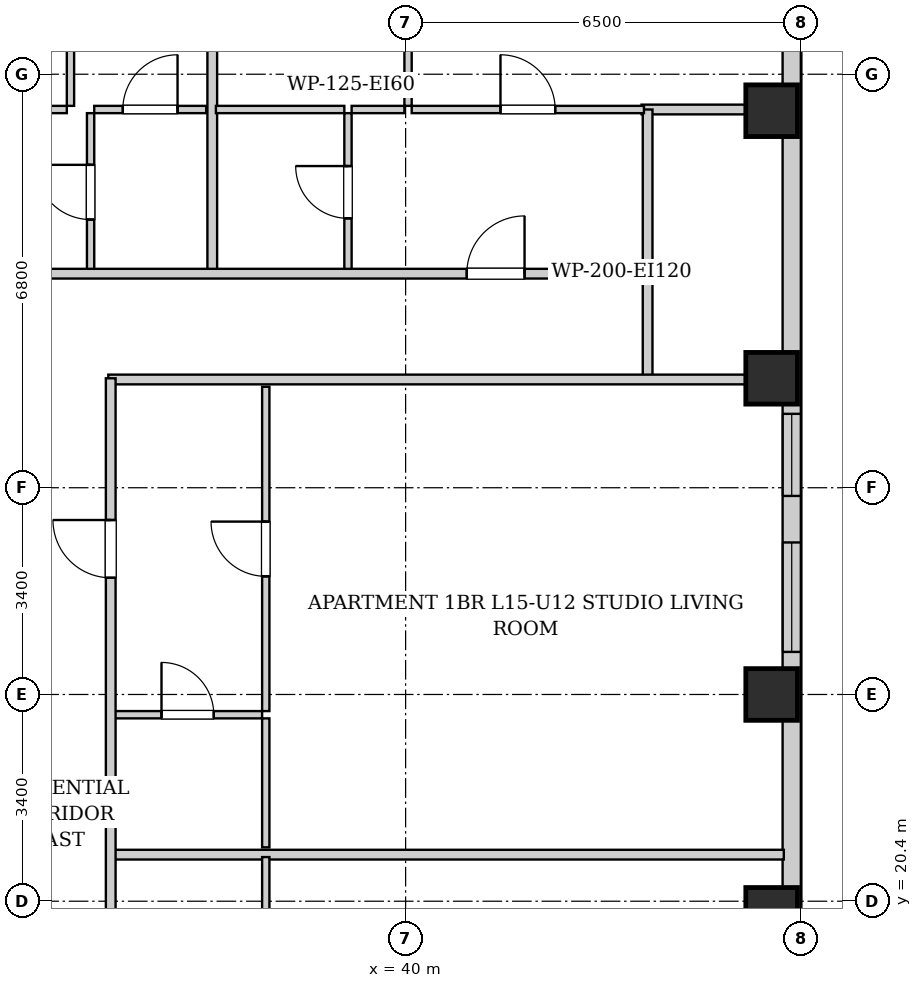
"""IFC4 building model, lengths in metres.
Left out: names, types, materials, properties, quantities, classifications, styles, units other than length and angle.
Written with IfcOpenShell. Run it as: python <this file> out.ifc"""

import sys

from ifc_helpers import new_model, si_unit, direction, frame, frame_2d, origin, origin_2d, place, context, subcontext, project, spatial, rectangle, extrude, element, fill, save


model = new_model("IFC4")
c1 = context("Model", 3, precision=1e-05, world=origin(), true_north=direction((0.0, 1.0)))
c2 = subcontext(c1, "Body", "Model", "MODEL_VIEW")
j1 = project(units=[si_unit("LENGTHUNIT", "METRE"), si_unit("PLANEANGLEUNIT", "RADIAN")], contexts=[c1])
p1 = place(None, origin())
s1 = spatial("IfcSite", under=j1, at=p1, CompositionType="ELEMENT")
p2 = place(p1, origin())
s2 = spatial("IfcBuilding", under=s1, at=p2, CompositionType="ELEMENT")
p3 = place(p2, frame((0.0, 0.0, 57.8)))
s3 = spatial("IfcBuildingStorey", under=s2, at=p3, CompositionType="ELEMENT", Elevation=57.8)
for number, where, z_axis, x_axis in (
    (1, (46.02, 20.2, 0.0), (0.0, 0.0, 1.0), (1.0, 0.0, 0.0)),
    (2, (46.02, 23.8, 0.0), (0.0, 0.0, 1.0), (1.0, 0.0, 0.0)),
    (3, (46.02, 29.0, 0.0), (0.0, 0.0, 1.0), (1.0, 0.0, 0.0)),
    (4, (46.02, 33.4, 0.0), (0.0, 0.0, 1.0), (1.0, 0.0, 0.0)),
):
    element("IfcColumn", number, at=place(p3, frame(where, z_axis=z_axis, x_axis=x_axis)), inside=s3, PredefinedType="COLUMN", context=c2, shape_type="SweptSolid", body=[
        extrude(rectangle(XDim=0.85, YDim=0.85, at=origin_2d()), origin(), (0.0, 0.0, 1.0), 3.2),
    ])
p4 = place(p3, frame((46.35, 45.1, 0.0), z_axis=(0.0, 0.0, 1.0), x_axis=(0.0, -1.0, 0.0)))
e5 = element("IfcWall", 5, at=p4, inside=s3, PredefinedType="SOLIDWALL", context=c2, shape_type="SweptSolid", body=[
    extrude(rectangle(XDim=42.6, YDim=0.3, at=frame_2d((21.3, 0.0))), origin(), (0.0, 0.0, 1.0), 1.975),
])
p5 = place(p4, frame((37.575, 0.0, 0.55)))
e6 = element("IfcOpeningElement", 6, at=p5, cuts=e5, PredefinedType="OPENING", context=c2, shape_type="SweptSolid", body=[
    extrude(rectangle(XDim=1.8, YDim=1.2, at=frame_2d((0.9, 0.6))), frame((0.0, 0.16, 0.0), z_axis=(0.0, -1.0, 0.0), x_axis=(1.0, 0.0, 0.0)), (0.0, 0.0, 1.0), 0.32),
])
p6 = place(p4, frame((34.85, 0.0, 0.55)))
e7 = element("IfcOpeningElement", 7, at=p6, cuts=e5, PredefinedType="OPENING", context=c2, shape_type="SweptSolid", body=[
    extrude(rectangle(XDim=1.35, YDim=1.2, at=frame_2d((0.675, 0.6))), frame((0.0, 0.16, 0.0), z_axis=(0.0, -1.0, 0.0), x_axis=(1.0, 0.0, 0.0)), (0.0, 0.0, 1.0), 0.32),
])
p7 = place(p4, frame((3.715, 0.0, 0.55)))
e8 = element("IfcOpeningElement", 8, at=p7, cuts=e5, PredefinedType="OPENING", context=c2, shape_type="SweptSolid", body=[
    extrude(rectangle(XDim=1.8, YDim=1.2, at=frame_2d((0.9, 0.6))), frame((0.0, 0.16, 0.0), z_axis=(0.0, -1.0, 0.0), x_axis=(1.0, 0.0, 0.0)), (0.0, 0.0, 1.0), 0.32),
])
p8 = place(p4, frame((1.185, 0.0, 0.55)))
e9 = element("IfcOpeningElement", 9, at=p8, cuts=e5, PredefinedType="OPENING", context=c2, shape_type="SweptSolid", body=[
    extrude(rectangle(XDim=1.35, YDim=1.2, at=frame_2d((0.675, 0.6))), frame((0.0, 0.16, 0.0), z_axis=(0.0, -1.0, 0.0), x_axis=(1.0, 0.0, 0.0)), (0.0, 0.0, 1.0), 0.32),
])
p9 = place(p4, frame((26.025, 0.0, 0.55)))
e10 = element("IfcOpeningElement", 10, at=p9, cuts=e5, PredefinedType="OPENING", context=c2, shape_type="SweptSolid", body=[
    extrude(rectangle(XDim=1.8, YDim=1.2, at=frame_2d((0.9, 0.6))), frame((0.0, 0.16, 0.0), z_axis=(0.0, -1.0, 0.0), x_axis=(1.0, 0.0, 0.0)), (0.0, 0.0, 1.0), 0.32),
])
p10 = place(p4, frame((28.085, 0.0, 0.55)))
e11 = element("IfcOpeningElement", 11, at=p10, cuts=e5, PredefinedType="OPENING", context=c2, shape_type="SweptSolid", body=[
    extrude(rectangle(XDim=1.35, YDim=1.2, at=frame_2d((0.675, 0.6))), frame((0.0, 0.16, 0.0), z_axis=(0.0, -1.0, 0.0), x_axis=(1.0, 0.0, 0.0)), (0.0, 0.0, 1.0), 0.32),
])
p11 = place(p4, frame((18.8, 0.0, 0.55)))
e12 = element("IfcOpeningElement", 12, at=p11, cuts=e5, PredefinedType="OPENING", context=c2, shape_type="SweptSolid", body=[
    extrude(rectangle(XDim=1.8, YDim=1.2, at=frame_2d((0.9, 0.6))), frame((0.0, 0.16, 0.0), z_axis=(0.0, -1.0, 0.0), x_axis=(1.0, 0.0, 0.0)), (0.0, 0.0, 1.0), 0.32),
])
p12 = place(p4, frame((16.685, 0.0, 0.55)))
e13 = element("IfcOpeningElement", 13, at=p12, cuts=e5, PredefinedType="OPENING", context=c2, shape_type="SweptSolid", body=[
    extrude(rectangle(XDim=1.35, YDim=1.2, at=frame_2d((0.675, 0.6))), frame((0.0, 0.16, 0.0), z_axis=(0.0, -1.0, 0.0), x_axis=(1.0, 0.0, 0.0)), (0.0, 0.0, 1.0), 0.32),
])
p13 = place(p3, frame((43.98, 28.98, 0.0), z_axis=(0.0, 0.0, 1.0), x_axis=(0.0, 1.0, 0.0)))
e14 = element("IfcWall", 14, at=p13, inside=s3, PredefinedType="PARTITIONING", context=c2, shape_type="SweptSolid", body=[
    extrude(rectangle(XDim=1.74, YDim=0.16, at=frame_2d((0.87, 0.0))), origin(), (0.0, 0.0, 1.0), 2.94),
])
p14 = place(p3, frame((35.11, 28.98, 0.0), z_axis=(0.0, 0.0, 1.0), x_axis=(1.0, 0.0, 0.0)))
e15 = element("IfcWall", 15, at=p14, inside=s3, PredefinedType="PARTITIONING", context=c2, shape_type="SweptSolid", body=[
    extrude(rectangle(XDim=11.11, YDim=0.16, at=frame_2d((5.555, 0.0))), origin(), (0.0, 0.0, 1.0), 2.232),
])
p15 = place(p3, frame((34.819, 30.76, 0.0), z_axis=(0.0, 0.0, 1.0), x_axis=(0.0, 1.0, 0.0)))
e16 = element("IfcWall", 16, at=p15, inside=s3, PredefinedType="PARTITIONING", context=c2, shape_type="SweptSolid", body=[
    extrude(rectangle(XDim=2.6, YDim=0.12, at=frame_2d((1.3, 0.0))), origin(), (0.0, 0.0, 1.0), 2.94),
])
p16 = place(p15, frame((0.85, 0.0, 0.0)))
e17 = element("IfcOpeningElement", 17, at=p16, cuts=e16, PredefinedType="OPENING", context=c2, shape_type="SweptSolid", body=[
    extrude(rectangle(XDim=0.9, YDim=2.05, at=frame_2d((0.45, 1.025))), frame((0.0, 0.07, 0.0), z_axis=(0.0, -1.0, 0.0), x_axis=(1.0, 0.0, 0.0)), (0.0, 0.0, 1.0), 0.14),
])
p17 = place(p3, frame((31.676, 33.42, 0.0), z_axis=(0.0, 0.0, 1.0), x_axis=(1.0, 0.0, 0.0)))
e18 = element("IfcWall", 18, at=p17, inside=s3, PredefinedType="PARTITIONING", context=c2, shape_type="SweptSolid", body=[
    extrude(rectangle(XDim=2.752, YDim=0.12, at=frame_2d((1.376, 0.0))), origin(), (0.0, 0.0, 1.0), 2.94),
])
p18 = place(p17, frame((0.926, 0.0, 0.0)))
e19 = element("IfcOpeningElement", 19, at=p18, cuts=e18, PredefinedType="OPENING", context=c2, shape_type="SweptSolid", body=[
    extrude(rectangle(XDim=0.9, YDim=2.05, at=frame_2d((0.45, 1.025))), frame((0.0, 0.07, 0.0), z_axis=(0.0, -1.0, 0.0), x_axis=(1.0, 0.0, 0.0)), (0.0, 0.0, 1.0), 0.14),
])
p19 = place(p3, frame((34.879, 33.42, 0.0), z_axis=(0.0, 0.0, 1.0), x_axis=(1.0, 0.0, 0.0)))
e20 = element("IfcWall", 20, at=p19, inside=s3, PredefinedType="PARTITIONING", context=c2, shape_type="SweptSolid", body=[
    extrude(rectangle(XDim=1.841, YDim=0.12, at=frame_2d((0.92, 0.0))), origin(), (0.0, 0.0, 1.0), 2.94),
])
p20 = place(p19, frame((0.47, 0.0, 0.0)))
e21 = element("IfcOpeningElement", 21, at=p20, cuts=e20, PredefinedType="OPENING", context=c2, shape_type="SweptSolid", body=[
    extrude(rectangle(XDim=0.9, YDim=2.05, at=frame_2d((0.45, 1.025))), frame((0.0, 0.07, 0.0), z_axis=(0.0, -1.0, 0.0), x_axis=(1.0, 0.0, 0.0)), (0.0, 0.0, 1.0), 0.14),
])
p21 = place(p3, frame((34.488, 33.48, 0.0), z_axis=(0.0, 0.0, 1.0), x_axis=(0.0, 1.0, 0.0)))
e22 = element("IfcWall", 22, at=p21, inside=s3, PredefinedType="PARTITIONING", context=c2, shape_type="SweptSolid", body=[
    extrude(rectangle(XDim=13.84, YDim=0.12, at=frame_2d((6.92, 0.0))), origin(), (0.0, 0.0, 1.0), 2.94),
])
p22 = place(p21, frame((6.455, 0.0, 0.0)))
e23 = element("IfcOpeningElement", 23, at=p22, cuts=e22, PredefinedType="OPENING", context=c2, shape_type="SweptSolid", body=[
    extrude(rectangle(XDim=0.9, YDim=2.05, at=frame_2d((0.45, 1.025))), frame((0.0, 0.07, 0.0), z_axis=(0.0, -1.0, 0.0), x_axis=(1.0, 0.0, 0.0)), (0.0, 0.0, 1.0), 0.14),
])
p23 = place(p3, frame((43.88, 33.42, 0.0), z_axis=(0.0, 0.0, 1.0), x_axis=(1.0, 0.0, 0.0)))
e24 = element("IfcWall", 24, at=p23, inside=s3, PredefinedType="PARTITIONING", context=c2, shape_type="SweptSolid", body=[
    extrude(rectangle(XDim=2.34, YDim=0.16, at=frame_2d((1.17, 0.0))), origin(), (0.0, 0.0, 1.0), 2.94),
])
p24 = place(p3, frame((43.98, 30.76, 0.0), z_axis=(0.0, 0.0, 1.0), x_axis=(0.0, 1.0, 0.0)))
e25 = element("IfcWall", 25, at=p24, inside=s3, PredefinedType="PARTITIONING", context=c2, shape_type="SweptSolid", body=[
    extrude(rectangle(XDim=2.66, YDim=0.16, at=frame_2d((1.33, 0.0))), origin(), (0.0, 0.0, 1.0), 2.94),
])
p25 = place(p3, frame((36.82, 30.76, 0.0), z_axis=(0.0, 0.0, 1.0), x_axis=(0.0, 1.0, 0.0)))
e26 = element("IfcWall", 26, at=p25, inside=s3, PredefinedType="PARTITIONING", context=c2, shape_type="SweptSolid", body=[
    extrude(rectangle(XDim=16.56, YDim=0.16, at=frame_2d((8.28, 0.0))), origin(), (0.0, 0.0, 1.0), 2.94),
])
p26 = place(p3, frame((39.052, 30.76, 0.0), z_axis=(0.0, 0.0, 1.0), x_axis=(0.0, 1.0, 0.0)))
e27 = element("IfcWall", 27, at=p26, inside=s3, PredefinedType="PARTITIONING", context=c2, shape_type="SweptSolid", body=[
    extrude(rectangle(XDim=2.6, YDim=0.12, at=frame_2d((1.3, 0.0))), origin(), (0.0, 0.0, 1.0), 2.94),
])
p27 = place(p26, frame((0.87, 0.0, 0.0)))
e28 = element("IfcOpeningElement", 28, at=p27, cuts=e27, PredefinedType="OPENING", context=c2, shape_type="SweptSolid", body=[
    extrude(rectangle(XDim=0.86, YDim=2.05, at=frame_2d((0.43, 1.025))), frame((0.0, 0.07, 0.0), z_axis=(0.0, -1.0, 0.0), x_axis=(1.0, 0.0, 0.0)), (0.0, 0.0, 1.0), 0.14),
])
p28 = place(p3, frame((36.88, 33.42, 0.0), z_axis=(0.0, 0.0, 1.0), x_axis=(1.0, 0.0, 0.0)))
e29 = element("IfcWall", 29, at=p28, inside=s3, PredefinedType="PARTITIONING", context=c2, shape_type="SweptSolid", body=[
    extrude(rectangle(XDim=2.112, YDim=0.12, at=frame_2d((1.056, 0.0))), origin(), (0.0, 0.0, 1.0), 2.94),
])
p29 = place(p3, frame((39.112, 33.42, 0.0), z_axis=(0.0, 0.0, 1.0), x_axis=(1.0, 0.0, 0.0)))
e30 = element("IfcWall", 30, at=p29, inside=s3, PredefinedType="PARTITIONING", context=c2, shape_type="SweptSolid", body=[
    extrude(rectangle(XDim=0.868, YDim=0.12, at=frame_2d((0.434, 0.0))), origin(), (0.0, 0.0, 1.0), 2.94),
])
p30 = place(p3, frame((40.1, 33.42, 0.0), z_axis=(0.0, 0.0, 1.0), x_axis=(1.0, 0.0, 0.0)))
e31 = element("IfcWall", 31, at=p30, inside=s3, PredefinedType="PARTITIONING", context=c2, shape_type="SweptSolid", body=[
    extrude(rectangle(XDim=3.82, YDim=0.12, at=frame_2d((1.91, 0.0))), origin(), (0.0, 0.0, 1.0), 2.94),
])
p31 = place(p30, frame((1.46, 0.0, 0.0)))
e32 = element("IfcOpeningElement", 32, at=p31, cuts=e31, PredefinedType="OPENING", context=c2, shape_type="SweptSolid", body=[
    extrude(rectangle(XDim=0.9, YDim=2.05, at=frame_2d((0.45, 1.025))), frame((0.0, 0.07, 0.0), z_axis=(0.0, -1.0, 0.0), x_axis=(1.0, 0.0, 0.0)), (0.0, 0.0, 1.0), 0.14),
])
p32 = place(p3, frame((40.04, 33.48, 0.0), z_axis=(0.0, 0.0, 1.0), x_axis=(0.0, 1.0, 0.0)))
e33 = element("IfcWall", 33, at=p32, inside=s3, PredefinedType="PARTITIONING", context=c2, shape_type="SweptSolid", body=[
    extrude(rectangle(XDim=11.69, YDim=0.12, at=frame_2d((5.845, 0.0))), origin(), (0.0, 0.0, 1.0), 2.94),
])
p33 = place(p32, frame((5.395, 0.0, 0.0)))
e34 = element("IfcOpeningElement", 34, at=p33, cuts=e33, PredefinedType="OPENING", context=c2, shape_type="SweptSolid", body=[
    extrude(rectangle(XDim=0.9, YDim=2.05, at=frame_2d((0.45, 1.025))), frame((0.0, 0.07, 0.0), z_axis=(0.0, -1.0, 0.0), x_axis=(1.0, 0.0, 0.0)), (0.0, 0.0, 1.0), 0.14),
])
p34 = place(p3, frame((35.19, 21.166, 0.0), z_axis=(0.0, 0.0, 1.0), x_axis=(1.0, 0.0, 0.0)))
e35 = element("IfcWall", 35, at=p34, inside=s3, PredefinedType="PARTITIONING", context=c2, shape_type="SweptSolid", body=[
    extrude(rectangle(XDim=11.03, YDim=0.16, at=frame_2d((5.515, 0.0))), origin(), (0.0, 0.0, 1.0), 2.94),
])
p35 = place(p3, frame((37.7, 17.18, 0.0), z_axis=(0.0, 0.0, 1.0), x_axis=(0.0, 1.0, 0.0)))
e36 = element("IfcWall", 36, at=p35, inside=s3, PredefinedType="PARTITIONING", context=c2, shape_type="SweptSolid", body=[
    extrude(rectangle(XDim=3.946, YDim=0.12, at=frame_2d((1.973, 0.0))), origin(), (0.0, 0.0, 1.0), 2.94),
])
p36 = place(p35, frame((1.523, 0.0, 0.0)))
e37 = element("IfcOpeningElement", 37, at=p36, cuts=e36, PredefinedType="OPENING", context=c2, shape_type="SweptSolid", body=[
    extrude(rectangle(XDim=0.9, YDim=2.05, at=frame_2d((0.45, 1.025))), frame((0.0, 0.07, 0.0), z_axis=(0.0, -1.0, 0.0), x_axis=(1.0, 0.0, 0.0)), (0.0, 0.0, 1.0), 0.14),
])
p37 = place(p3, frame((35.19, 23.467, 0.0), z_axis=(0.0, 0.0, 1.0), x_axis=(1.0, 0.0, 0.0)))
e38 = element("IfcWall", 38, at=p37, inside=s3, PredefinedType="PARTITIONING", context=c2, shape_type="SweptSolid", body=[
    extrude(rectangle(XDim=2.45, YDim=0.12, at=frame_2d((1.225, 0.0))), origin(), (0.0, 0.0, 1.0), 2.94),
])
p38 = place(p37, frame((0.795, 0.0, 0.0)))
e39 = element("IfcOpeningElement", 39, at=p38, cuts=e38, PredefinedType="OPENING", context=c2, shape_type="SweptSolid", body=[
    extrude(rectangle(XDim=0.86, YDim=2.05, at=frame_2d((0.43, 1.025))), frame((0.0, 0.07, 0.0), z_axis=(0.0, -1.0, 0.0), x_axis=(1.0, 0.0, 0.0)), (0.0, 0.0, 1.0), 0.14),
])
p39 = place(p3, frame((37.7, 21.286, 0.0), z_axis=(0.0, 0.0, 1.0), x_axis=(0.0, 1.0, 0.0)))
e40 = element("IfcWall", 40, at=p39, inside=s3, PredefinedType="PARTITIONING", context=c2, shape_type="SweptSolid", body=[
    extrude(rectangle(XDim=2.121, YDim=0.12, at=frame_2d((1.061, 0.0))), origin(), (0.0, 0.0, 1.0), 2.94),
])
p40 = place(p3, frame((37.7, 23.527, 0.0), z_axis=(0.0, 0.0, 1.0), x_axis=(0.0, 1.0, 0.0)))
e41 = element("IfcWall", 41, at=p40, inside=s3, PredefinedType="PARTITIONING", context=c2, shape_type="SweptSolid", body=[
    extrude(rectangle(XDim=5.333, YDim=0.12, at=frame_2d((2.667, 0.0))), origin(), (0.0, 0.0, 1.0), 2.94),
])
p41 = place(p40, frame((2.216, 0.0, 0.0)))
e42 = element("IfcOpeningElement", 42, at=p41, cuts=e41, PredefinedType="OPENING", context=c2, shape_type="SweptSolid", body=[
    extrude(rectangle(XDim=0.9, YDim=2.05, at=frame_2d((0.45, 1.025))), frame((0.0, 0.07, 0.0), z_axis=(0.0, -1.0, 0.0), x_axis=(1.0, 0.0, 0.0)), (0.0, 0.0, 1.0), 0.14),
])
p42 = place(p3, frame((10.05, 30.72, 0.0), z_axis=(0.0, 0.0, 1.0), x_axis=(1.0, 0.0, 0.0)))
e43 = element("IfcWall", 43, at=p42, inside=s3, PredefinedType="PARTITIONING", context=c2, shape_type="SweptSolid", body=[
    extrude(rectangle(XDim=33.9, YDim=0.16, at=frame_2d((16.95, 0.0))), origin(), (0.0, 0.0, 1.0), 2.94),
])
p43 = place(p42, frame((3.8, 0.0, 0.0)))
e44 = element("IfcOpeningElement", 44, at=p43, cuts=e43, PredefinedType="OPENING", context=c2, shape_type="SweptSolid", body=[
    extrude(rectangle(XDim=0.95, YDim=2.1, at=frame_2d((0.475, 1.05))), frame((0.0, 0.09, 0.0), z_axis=(0.0, -1.0, 0.0), x_axis=(1.0, 0.0, 0.0)), (0.0, 0.0, 1.0), 0.18),
])
p44 = place(p42, frame((11.977, 0.0, 0.0)))
e45 = element("IfcOpeningElement", 45, at=p44, cuts=e43, PredefinedType="OPENING", context=c2, shape_type="SweptSolid", body=[
    extrude(rectangle(XDim=0.95, YDim=2.1, at=frame_2d((0.475, 1.05))), frame((0.0, 0.09, 0.0), z_axis=(0.0, -1.0, 0.0), x_axis=(1.0, 0.0, 0.0)), (0.0, 0.0, 1.0), 0.18),
])
p45 = place(p42, frame((18.09, 0.0, 0.0)))
e46 = element("IfcOpeningElement", 46, at=p45, cuts=e43, PredefinedType="OPENING", context=c2, shape_type="SweptSolid", body=[
    extrude(rectangle(XDim=0.95, YDim=2.1, at=frame_2d((0.475, 1.05))), frame((0.0, 0.09, 0.0), z_axis=(0.0, -1.0, 0.0), x_axis=(1.0, 0.0, 0.0)), (0.0, 0.0, 1.0), 0.18),
])
p46 = place(p42, frame((30.956, 0.0, 0.0)))
e47 = element("IfcOpeningElement", 47, at=p46, cuts=e43, PredefinedType="OPENING", context=c2, shape_type="SweptSolid", body=[
    extrude(rectangle(XDim=0.95, YDim=2.1, at=frame_2d((0.475, 1.05))), frame((0.0, 0.09, 0.0), z_axis=(0.0, -1.0, 0.0), x_axis=(1.0, 0.0, 0.0)), (0.0, 0.0, 1.0), 0.18),
])
p47 = place(p3, frame((35.15, 15.07, 0.0), z_axis=(0.0, 0.0, 1.0), x_axis=(0.0, 1.0, 0.0)))
e48 = element("IfcWall", 48, at=p47, inside=s3, PredefinedType="PARTITIONING", context=c2, shape_type="SweptSolid", body=[
    extrude(rectangle(XDim=13.93, YDim=0.16, at=frame_2d((6.965, 0.0))), origin(), (0.0, 0.0, 1.0), 2.94),
])
p48 = place(p47, frame((3.608, 0.0, 0.0)))
e49 = element("IfcOpeningElement", 49, at=p48, cuts=e48, PredefinedType="OPENING", context=c2, shape_type="SweptSolid", body=[
    extrude(rectangle(XDim=0.95, YDim=2.1, at=frame_2d((0.475, 1.05))), frame((0.0, 0.09, 0.0), z_axis=(0.0, -1.0, 0.0), x_axis=(1.0, 0.0, 0.0)), (0.0, 0.0, 1.0), 0.18),
])
p49 = place(p47, frame((10.649, 0.0, 0.0)))
e50 = element("IfcOpeningElement", 50, at=p49, cuts=e48, PredefinedType="OPENING", context=c2, shape_type="SweptSolid", body=[
    extrude(rectangle(XDim=0.95, YDim=2.1, at=frame_2d((0.475, 1.05))), frame((0.0, 0.09, 0.0), z_axis=(0.0, -1.0, 0.0), x_axis=(1.0, 0.0, 0.0)), (0.0, 0.0, 1.0), 0.18),
])
p50 = place(p16, origin())
e51 = element("IfcDoor", 51, at=p50, inside=s3, OperationType="SINGLE_SWING_RIGHT", PredefinedType="DOOR", context=c2, shape_type="SweptSolid", body=[
    extrude(rectangle(XDim=0.9, YDim=2.05, at=frame_2d((0.45, 1.025))), frame((0.0, 0.025, 0.0), z_axis=(0.0, -1.0, 0.0), x_axis=(1.0, 0.0, 0.0)), (0.0, 0.0, 1.0), 0.05),
])
fill(e17, e51)
p51 = place(p20, origin())
e52 = element("IfcDoor", 52, at=p51, inside=s3, OperationType="SINGLE_SWING_RIGHT", PredefinedType="DOOR", context=c2, shape_type="SweptSolid", body=[
    extrude(rectangle(XDim=0.9, YDim=2.05, at=frame_2d((0.45, 1.025))), frame((0.0, 0.025, 0.0), z_axis=(0.0, -1.0, 0.0), x_axis=(1.0, 0.0, 0.0)), (0.0, 0.0, 1.0), 0.05),
])
fill(e21, e52)
p52 = place(p27, origin())
e53 = element("IfcDoor", 53, at=p52, inside=s3, OperationType="SINGLE_SWING_RIGHT", PredefinedType="DOOR", context=c2, shape_type="SweptSolid", body=[
    extrude(rectangle(XDim=0.86, YDim=2.05, at=frame_2d((0.43, 1.025))), frame((0.0, 0.025, 0.0), z_axis=(0.0, -1.0, 0.0), x_axis=(1.0, 0.0, 0.0)), (0.0, 0.0, 1.0), 0.05),
])
fill(e28, e53)
p53 = place(p31, origin())
e54 = element("IfcDoor", 54, at=p53, inside=s3, OperationType="SINGLE_SWING_LEFT", PredefinedType="DOOR", context=c2, shape_type="SweptSolid", body=[
    extrude(rectangle(XDim=0.9, YDim=2.05, at=frame_2d((0.45, 1.025))), frame((0.0, 0.025, 0.0), z_axis=(0.0, -1.0, 0.0), x_axis=(1.0, 0.0, 0.0)), (0.0, 0.0, 1.0), 0.05),
])
fill(e32, e54)
p54 = place(p38, origin())
e55 = element("IfcDoor", 55, at=p54, inside=s3, OperationType="SINGLE_SWING_LEFT", PredefinedType="DOOR", context=c2, shape_type="SweptSolid", body=[
    extrude(rectangle(XDim=0.86, YDim=2.05, at=frame_2d((0.43, 1.025))), frame((0.0, 0.025, 0.0), z_axis=(0.0, -1.0, 0.0), x_axis=(1.0, 0.0, 0.0)), (0.0, 0.0, 1.0), 0.05),
])
fill(e39, e55)
p55 = place(p41, origin())
e56 = element("IfcDoor", 56, at=p55, inside=s3, OperationType="SINGLE_SWING_RIGHT", PredefinedType="DOOR", context=c2, shape_type="SweptSolid", body=[
    extrude(rectangle(XDim=0.9, YDim=2.05, at=frame_2d((0.45, 1.025))), frame((0.0, 0.025, 0.0), z_axis=(0.0, -1.0, 0.0), x_axis=(1.0, 0.0, 0.0)), (0.0, 0.0, 1.0), 0.05),
])
fill(e42, e56)
p56 = place(p46, origin())
e57 = element("IfcDoor", 57, at=p56, inside=s3, OperationType="SINGLE_SWING_RIGHT", PredefinedType="DOOR", context=c2, shape_type="SweptSolid", body=[
    extrude(rectangle(XDim=0.95, YDim=2.1, at=frame_2d((0.475, 1.05))), frame((0.0, 0.025, 0.0), z_axis=(0.0, -1.0, 0.0), x_axis=(1.0, 0.0, 0.0)), (0.0, 0.0, 1.0), 0.05),
])
fill(e47, e57)
p57 = place(p49, origin())
e58 = element("IfcDoor", 58, at=p57, inside=s3, OperationType="SINGLE_SWING_RIGHT", PredefinedType="DOOR", context=c2, shape_type="SweptSolid", body=[
    extrude(rectangle(XDim=0.95, YDim=2.1, at=frame_2d((0.475, 1.05))), frame((0.0, 0.025, 0.0), z_axis=(0.0, -1.0, 0.0), x_axis=(1.0, 0.0, 0.0)), (0.0, 0.0, 1.0), 0.05),
])
fill(e50, e58)
p58 = place(p11, origin())
e59 = element("IfcWindow", 59, at=p58, inside=s3, PartitioningType="DOUBLE_PANEL_VERTICAL", PredefinedType="WINDOW", context=c2, shape_type="SweptSolid", body=[
    extrude(rectangle(XDim=1.8, YDim=1.2, at=frame_2d((0.9, 0.6))), frame((0.0, 0.03, 0.0), z_axis=(0.0, -1.0, 0.0), x_axis=(1.0, 0.0, 0.0)), (0.0, 0.0, 1.0), 0.06),
])
fill(e12, e59)
p59 = place(p12, origin())
e60 = element("IfcWindow", 60, at=p59, inside=s3, PartitioningType="SINGLE_PANEL", PredefinedType="WINDOW", context=c2, shape_type="SweptSolid", body=[
    extrude(rectangle(XDim=1.35, YDim=1.2, at=frame_2d((0.675, 0.6))), frame((0.0, 0.03, 0.0), z_axis=(0.0, -1.0, 0.0), x_axis=(1.0, 0.0, 0.0)), (0.0, 0.0, 1.0), 0.06),
])
fill(e13, e60)
save(model, sys.argv[1])
